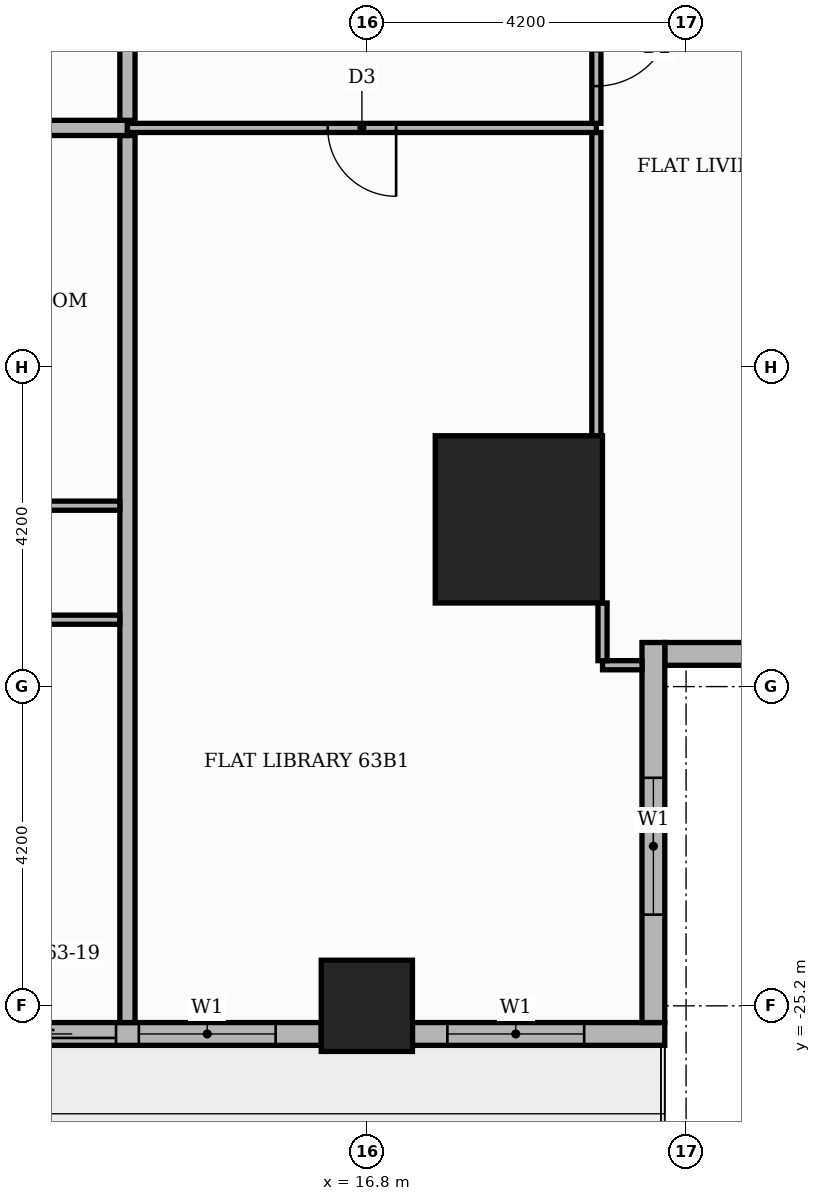
"""IFC4 building model, lengths in metres.
Left out: names, types, materials, properties, quantities, classifications, styles, units other than length and angle.
Written with IfcOpenShell. Run it as: python <this file> out.ifc"""

import sys

from ifc_helpers import new_model, si_unit, direction, frame, frame_2d, origin, origin_2d, place, context, subcontext, project, spatial, rectangle, extrude, element, fill, save


model = new_model("IFC4")
c1 = context("Model", 3, precision=1e-05, world=origin(), true_north=direction((0.0, 1.0)))
c2 = subcontext(c1, "Body", "Model", "MODEL_VIEW")
j1 = project(units=[si_unit("LENGTHUNIT", "METRE"), si_unit("PLANEANGLEUNIT", "RADIAN")], contexts=[c1])
p1 = place(None, origin())
s1 = spatial("IfcSite", under=j1, at=p1, CompositionType="ELEMENT")
p2 = place(p1, origin())
s2 = spatial("IfcBuilding", under=s1, at=p2, CompositionType="ELEMENT")
p3 = place(p2, frame((0.0, 0.0, 264.0)))
s3 = spatial("IfcBuildingStorey", under=s2, at=p3, CompositionType="ELEMENT", Elevation=264.0)
p4 = place(p3, frame((18.8, -18.8, 0.0), z_axis=(0.0, 0.0, 1.0), x_axis=(1.0, 0.0, 0.0)))
e1 = element("IfcColumn", 1, at=p4, inside=s3, PredefinedType="COLUMN", context=c2, shape_type="SweptSolid", body=[
    extrude(rectangle(XDim=2.2, YDim=2.2, at=origin_2d()), origin(), (0.0, 0.0, 1.0), 3.9),
])
p5 = place(p3, frame((16.8, -25.2, 0.0), z_axis=(0.0, 0.0, 1.0), x_axis=(1.0, 0.0, 0.0)))
e2 = element("IfcColumn", 2, at=p5, inside=s3, PredefinedType="COLUMN", context=c2, shape_type="SweptSolid", body=[
    extrude(rectangle(XDim=1.2, YDim=1.2, at=origin_2d()), origin(), (0.0, 0.0, 1.0), 3.9),
])
p6 = place(p3, frame((20.72, -20.57, 0.0), z_axis=(0.0, 0.0, 1.0), x_axis=(1.0, 0.0, 0.0)))
e3 = element("IfcWall", 3, at=p6, inside=s3, PredefinedType="STANDARD", context=c2, shape_type="SweptSolid", body=[
    extrude(rectangle(XDim=5.0, YDim=0.3, at=frame_2d((2.5, 0.0))), origin(), (0.0, 0.0, 1.0), 3.48),
])
p7 = place(p6, frame((1.48, 0.0, 0.9)))
e4 = element("IfcOpeningElement", 4, at=p7, cuts=e3, PredefinedType="OPENING", context=c2, shape_type="SweptSolid", body=[
    extrude(rectangle(XDim=1.8, YDim=2.1, at=frame_2d((0.9, 1.05))), frame((0.0, 0.16, 0.0), z_axis=(0.0, -1.0, 0.0), x_axis=(1.0, 0.0, 0.0)), (0.0, 0.0, 1.0), 0.32),
])
p8 = place(p3, frame((9.75, -25.57, 0.0), z_axis=(0.0, 0.0, 1.0), x_axis=(1.0, 0.0, 0.0)))
e5 = element("IfcWall", 5, at=p8, inside=s3, PredefinedType="STANDARD", context=c2, shape_type="SweptSolid", body=[
    extrude(rectangle(XDim=6.45, YDim=0.3, at=frame_2d((3.225, 0.0))), origin(), (0.0, 0.0, 1.0), 3.48),
])
p9 = place(p8, frame((1.95, 0.0, 0.0)))
e6 = element("IfcOpeningElement", 6, at=p9, cuts=e5, PredefinedType="OPENING", context=c2, shape_type="SweptSolid", body=[
    extrude(rectangle(XDim=1.8, YDim=2.4, at=frame_2d((0.9, 1.2))), frame((0.0, 0.16, 0.0), z_axis=(0.0, -1.0, 0.0), x_axis=(1.0, 0.0, 0.0)), (0.0, 0.0, 1.0), 0.32),
])
p10 = place(p8, frame((4.05, 0.0, 0.9)))
e7 = element("IfcOpeningElement", 7, at=p10, cuts=e5, PredefinedType="OPENING", context=c2, shape_type="SweptSolid", body=[
    extrude(rectangle(XDim=1.8, YDim=2.1, at=frame_2d((0.9, 1.05))), frame((0.0, 0.16, 0.0), z_axis=(0.0, -1.0, 0.0), x_axis=(1.0, 0.0, 0.0)), (0.0, 0.0, 1.0), 0.32),
])
p11 = place(p3, frame((17.4, -25.57, 0.0), z_axis=(0.0, 0.0, 1.0), x_axis=(1.0, 0.0, 0.0)))
e8 = element("IfcWall", 8, at=p11, inside=s3, PredefinedType="STANDARD", context=c2, shape_type="SweptSolid", body=[
    extrude(rectangle(XDim=3.32, YDim=0.3, at=frame_2d((1.66, 0.0))), origin(), (0.0, 0.0, 1.0), 3.48),
])
p12 = place(p11, frame((0.459, 0.0, 0.9)))
e9 = element("IfcOpeningElement", 9, at=p12, cuts=e8, PredefinedType="OPENING", context=c2, shape_type="SweptSolid", body=[
    extrude(rectangle(XDim=1.8, YDim=2.1, at=frame_2d((0.9, 1.05))), frame((0.0, 0.16, 0.0), z_axis=(0.0, -1.0, 0.0), x_axis=(1.0, 0.0, 0.0)), (0.0, 0.0, 1.0), 0.32),
])
p13 = place(p3, frame((20.57, -25.42, 0.0), z_axis=(0.0, 0.0, 1.0), x_axis=(0.0, 1.0, 0.0)))
e10 = element("IfcWall", 10, at=p13, inside=s3, PredefinedType="STANDARD", context=c2, shape_type="SweptSolid", body=[
    extrude(rectangle(XDim=5.0, YDim=0.3, at=frame_2d((2.5, 0.0))), origin(), (0.0, 0.0, 1.0), 3.48),
])
p14 = place(p13, frame((1.42, 0.0, 0.9)))
e11 = element("IfcOpeningElement", 11, at=p14, cuts=e10, PredefinedType="OPENING", context=c2, shape_type="SweptSolid", body=[
    extrude(rectangle(XDim=1.8, YDim=2.1, at=frame_2d((0.9, 1.05))), frame((0.0, 0.16, 0.0), z_axis=(0.0, -1.0, 0.0), x_axis=(1.0, 0.0, 0.0)), (0.0, 0.0, 1.0), 0.32),
])
p15 = place(p3, frame((13.65, -25.42, 0.0), z_axis=(0.0, 0.0, 1.0), x_axis=(0.0, 1.0, 0.0)))
e12 = element("IfcWall", 12, at=p15, inside=s3, PredefinedType="PARTITIONING", context=c2, shape_type="SweptSolid", body=[
    extrude(rectangle(XDim=11.67, YDim=0.2, at=frame_2d((5.835, 0.0))), origin(), (0.0, 0.0, 1.0), 3.48),
])
p16 = place(p3, frame((19.901, -20.719, 0.0), z_axis=(0.0, 0.0, 1.0), x_axis=(1.0, 0.0, 0.0)))
e13 = element("IfcWall", 13, at=p16, inside=s3, PredefinedType="PARTITIONING", context=c2, shape_type="SweptSolid", body=[
    extrude(rectangle(XDim=0.52, YDim=0.12, at=frame_2d((0.26, 0.0))), origin(), (0.0, 0.0, 1.0), 3.48),
])
p17 = place(p3, frame((19.901, -20.659, 0.0), z_axis=(0.0, 0.0, 1.0), x_axis=(0.0, 1.0, 0.0)))
e14 = element("IfcWall", 14, at=p17, inside=s3, PredefinedType="PARTITIONING", context=c2, shape_type="SweptSolid", body=[
    extrude(rectangle(XDim=0.759, YDim=0.12, at=frame_2d((0.379, 0.0))), origin(), (0.0, 0.0, 1.0), 3.48),
])
p18 = place(p3, frame((9.45, -20.12, 0.0), z_axis=(0.0, 0.0, 1.0), x_axis=(1.0, 0.0, 0.0)))
e15 = element("IfcWall", 15, at=p18, inside=s3, PredefinedType="PARTITIONING", context=c2, shape_type="SweptSolid", body=[
    extrude(rectangle(XDim=4.1, YDim=0.12, at=frame_2d((2.05, 0.0))), origin(), (0.0, 0.0, 1.0), 3.48),
])
p19 = place(p18, frame((1.65, 0.0, 0.0)))
e16 = element("IfcOpeningElement", 16, at=p19, cuts=e15, PredefinedType="OPENING", context=c2, shape_type="SweptSolid", body=[
    extrude(rectangle(XDim=0.9, YDim=2.1, at=frame_2d((0.45, 1.05))), frame((0.0, 0.07, 0.0), z_axis=(0.0, -1.0, 0.0), x_axis=(1.0, 0.0, 0.0)), (0.0, 0.0, 1.0), 0.14),
])
p20 = place(p3, frame((-7.35, -18.62, 0.0), z_axis=(0.0, 0.0, 1.0), x_axis=(1.0, 0.0, 0.0)))
e17 = element("IfcWall", 17, at=p20, inside=s3, PredefinedType="PARTITIONING", context=c2, shape_type="SweptSolid", body=[
    extrude(rectangle(XDim=20.9, YDim=0.12, at=frame_2d((10.45, 0.0))), origin(), (0.0, 0.0, 1.0), 3.48),
])
p21 = place(p20, frame((2.7, 0.0, 0.0)))
e18 = element("IfcOpeningElement", 18, at=p21, cuts=e17, PredefinedType="OPENING", context=c2, shape_type="SweptSolid", body=[
    extrude(rectangle(XDim=0.9, YDim=2.1, at=frame_2d((0.45, 1.05))), frame((0.0, 0.07, 0.0), z_axis=(0.0, -1.0, 0.0), x_axis=(1.0, 0.0, 0.0)), (0.0, 0.0, 1.0), 0.14),
])
p22 = place(p20, frame((7.95, 0.0, 0.0)))
e19 = element("IfcOpeningElement", 19, at=p22, cuts=e17, PredefinedType="OPENING", context=c2, shape_type="SweptSolid", body=[
    extrude(rectangle(XDim=0.9, YDim=2.1, at=frame_2d((0.45, 1.05))), frame((0.0, 0.07, 0.0), z_axis=(0.0, -1.0, 0.0), x_axis=(1.0, 0.0, 0.0)), (0.0, 0.0, 1.0), 0.14),
])
p23 = place(p20, frame((11.1, 0.0, 0.0)))
e20 = element("IfcOpeningElement", 20, at=p23, cuts=e17, PredefinedType="OPENING", context=c2, shape_type="SweptSolid", body=[
    extrude(rectangle(XDim=0.9, YDim=2.1, at=frame_2d((0.45, 1.05))), frame((0.0, 0.07, 0.0), z_axis=(0.0, -1.0, 0.0), x_axis=(1.0, 0.0, 0.0)), (0.0, 0.0, 1.0), 0.14),
])
p24 = place(p20, frame((13.275, 0.0, 0.0)))
e21 = element("IfcOpeningElement", 21, at=p24, cuts=e17, PredefinedType="OPENING", context=c2, shape_type="SweptSolid", body=[
    extrude(rectangle(XDim=0.9, YDim=2.1, at=frame_2d((0.45, 1.05))), frame((0.0, 0.07, 0.0), z_axis=(0.0, -1.0, 0.0), x_axis=(1.0, 0.0, 0.0)), (0.0, 0.0, 1.0), 0.14),
])
p25 = place(p20, frame((15.375, 0.0, 0.0)))
e22 = element("IfcOpeningElement", 22, at=p25, cuts=e17, PredefinedType="OPENING", context=c2, shape_type="SweptSolid", body=[
    extrude(rectangle(XDim=0.9, YDim=2.1, at=frame_2d((0.45, 1.05))), frame((0.0, 0.07, 0.0), z_axis=(0.0, -1.0, 0.0), x_axis=(1.0, 0.0, 0.0)), (0.0, 0.0, 1.0), 0.14),
])
p26 = place(p20, frame((18.45, 0.0, 0.0)))
e23 = element("IfcOpeningElement", 23, at=p26, cuts=e17, PredefinedType="OPENING", context=c2, shape_type="SweptSolid", body=[
    extrude(rectangle(XDim=0.9, YDim=2.1, at=frame_2d((0.45, 1.05))), frame((0.0, 0.07, 0.0), z_axis=(0.0, -1.0, 0.0), x_axis=(1.0, 0.0, 0.0)), (0.0, 0.0, 1.0), 0.14),
])
p27 = place(p3, frame((19.82, -17.7, 0.0), z_axis=(0.0, 0.0, 1.0), x_axis=(0.0, 1.0, 0.0)))
e24 = element("IfcWall", 24, at=p27, inside=s3, PredefinedType="PARTITIONING", context=c2, shape_type="SweptSolid", body=[
    extrude(rectangle(XDim=3.99, YDim=0.12, at=frame_2d((1.995, 0.0))), origin(), (0.0, 0.0, 1.0), 3.48),
])
p28 = place(p3, frame((-25.42, -13.65, 0.0), z_axis=(0.0, 0.0, 1.0), x_axis=(1.0, 0.0, 0.0)))
e25 = element("IfcWall", 25, at=p28, inside=s3, PredefinedType="PARTITIONING", context=c2, shape_type="SweptSolid", body=[
    extrude(rectangle(XDim=39.07, YDim=0.2, at=frame_2d((19.535, 0.0))), origin(), (0.0, 0.0, 1.0), 3.48),
])
p29 = place(p28, frame((14.37, 0.0, 0.0)))
e26 = element("IfcOpeningElement", 26, at=p29, cuts=e25, PredefinedType="OPENING", context=c2, shape_type="SweptSolid", body=[
    extrude(rectangle(XDim=1.1, YDim=2.4, at=frame_2d((0.55, 1.2))), frame((0.0, 0.11, 0.0), z_axis=(0.0, -1.0, 0.0), x_axis=(1.0, 0.0, 0.0)), (0.0, 0.0, 1.0), 0.22),
])
p30 = place(p3, frame((13.65, -13.65, 0.0), z_axis=(0.0, 0.0, 1.0), x_axis=(1.0, 0.0, 0.0)))
e27 = element("IfcWall", 27, at=p30, inside=s3, PredefinedType="PARTITIONING", context=c2, shape_type="SweptSolid", body=[
    extrude(rectangle(XDim=6.17, YDim=0.12, at=frame_2d((3.085, 0.0))), origin(), (0.0, 0.0, 1.0), 3.48),
])
p31 = place(p30, frame((2.635, 0.0, 0.0)))
e28 = element("IfcOpeningElement", 28, at=p31, cuts=e27, PredefinedType="OPENING", context=c2, shape_type="SweptSolid", body=[
    extrude(rectangle(XDim=0.9, YDim=2.1, at=frame_2d((0.45, 1.05))), frame((0.0, 0.07, 0.0), z_axis=(0.0, -1.0, 0.0), x_axis=(1.0, 0.0, 0.0)), (0.0, 0.0, 1.0), 0.14),
])
p32 = place(p3, frame((19.82, -13.59, 0.0), z_axis=(0.0, 0.0, 1.0), x_axis=(0.0, 1.0, 0.0)))
e29 = element("IfcWall", 29, at=p32, inside=s3, PredefinedType="PARTITIONING", context=c2, shape_type="SweptSolid", body=[
    extrude(rectangle(XDim=1.98, YDim=0.12, at=frame_2d((0.99, 0.0))), origin(), (0.0, 0.0, 1.0), 3.48),
])
p33 = place(p32, frame((0.49, 0.0, 0.0)))
e30 = element("IfcOpeningElement", 30, at=p33, cuts=e29, PredefinedType="OPENING", context=c2, shape_type="SweptSolid", body=[
    extrude(rectangle(XDim=1.0, YDim=2.1, at=frame_2d((0.5, 1.05))), frame((0.0, 0.07, 0.0), z_axis=(0.0, -1.0, 0.0), x_axis=(1.0, 0.0, 0.0)), (0.0, 0.0, 1.0), 0.14),
])
p34 = place(p3, frame((13.65, -13.55, 0.0), z_axis=(0.0, 0.0, 1.0), x_axis=(0.0, 1.0, 0.0)))
e31 = element("IfcWall", 31, at=p34, inside=s3, PredefinedType="PARTITIONING", context=c2, shape_type="SweptSolid", body=[
    extrude(rectangle(XDim=2.45, YDim=0.2, at=frame_2d((1.225, 0.0))), origin(), (0.0, 0.0, 1.0), 3.48),
])
p35 = place(p9, origin())
e32 = element("IfcDoor", 32, at=p35, inside=s3, OperationType="SLIDING_TO_RIGHT", PredefinedType="DOOR", context=c2, shape_type="SweptSolid", body=[
    extrude(rectangle(XDim=1.8, YDim=2.4, at=frame_2d((0.9, 1.2))), frame((0.0, 0.025, 0.0), z_axis=(0.0, -1.0, 0.0), x_axis=(1.0, 0.0, 0.0)), (0.0, 0.0, 1.0), 0.05),
])
fill(e6, e32)
p36 = place(p10, origin())
e33 = element("IfcWindow", 33, at=p36, inside=s3, PartitioningType="SINGLE_PANEL", PredefinedType="WINDOW", context=c2, shape_type="SweptSolid", body=[
    extrude(rectangle(XDim=1.8, YDim=2.1, at=frame_2d((0.9, 1.05))), frame((0.0, 0.03, 0.0), z_axis=(0.0, -1.0, 0.0), x_axis=(1.0, 0.0, 0.0)), (0.0, 0.0, 1.0), 0.06),
])
fill(e7, e33)
p37 = place(p12, origin())
e34 = element("IfcWindow", 34, at=p37, inside=s3, PartitioningType="SINGLE_PANEL", PredefinedType="WINDOW", context=c2, shape_type="SweptSolid", body=[
    extrude(rectangle(XDim=1.8, YDim=2.1, at=frame_2d((0.9, 1.05))), frame((0.0, 0.03, 0.0), z_axis=(0.0, -1.0, 0.0), x_axis=(1.0, 0.0, 0.0)), (0.0, 0.0, 1.0), 0.06),
])
fill(e9, e34)
p38 = place(p14, origin())
e35 = element("IfcWindow", 35, at=p38, inside=s3, PartitioningType="SINGLE_PANEL", PredefinedType="WINDOW", context=c2, shape_type="SweptSolid", body=[
    extrude(rectangle(XDim=1.8, YDim=2.1, at=frame_2d((0.9, 1.05))), frame((0.0, 0.03, 0.0), z_axis=(0.0, -1.0, 0.0), x_axis=(1.0, 0.0, 0.0)), (0.0, 0.0, 1.0), 0.06),
])
fill(e11, e35)
p39 = place(p31, frame((0.9, 0.0, 0.0), z_axis=(0.0, 0.0, 1.0), x_axis=(-1.0, 0.0, 0.0)))
e36 = element("IfcDoor", 36, at=p39, inside=s3, OperationType="SINGLE_SWING_RIGHT", PredefinedType="DOOR", context=c2, shape_type="SweptSolid", body=[
    extrude(rectangle(XDim=0.9, YDim=2.1, at=frame_2d((0.45, 1.05))), frame((0.0, 0.025, 0.0), z_axis=(0.0, -1.0, 0.0), x_axis=(1.0, 0.0, 0.0)), (0.0, 0.0, 1.0), 0.05),
])
fill(e28, e36)
p40 = place(p33, frame((1.0, 0.0, 0.0), z_axis=(0.0, 0.0, 1.0), x_axis=(-1.0, 0.0, 0.0)))
e37 = element("IfcDoor", 37, at=p40, inside=s3, OperationType="SINGLE_SWING_RIGHT", PredefinedType="DOOR", context=c2, shape_type="SweptSolid", body=[
    extrude(rectangle(XDim=1.0, YDim=2.1, at=frame_2d((0.5, 1.05))), frame((0.0, 0.025, 0.0), z_axis=(0.0, -1.0, 0.0), x_axis=(1.0, 0.0, 0.0)), (0.0, 0.0, 1.0), 0.05),
])
fill(e30, e37)
save(model, sys.argv[1])
